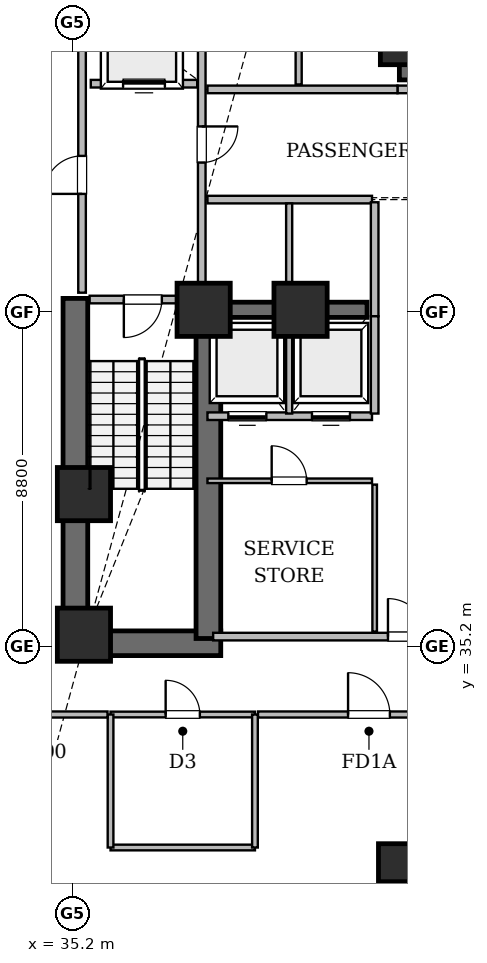
"""IFC4 building model, lengths in metres.
Left out: names, types, materials, properties, quantities, classifications, styles, units other than length and angle.
Written with IfcOpenShell. Run it as: python <this file> out.ifc"""

import sys

from ifc_helpers import new_model, si_unit, direction, frame, frame_2d, origin, origin_2d, place, context, subcontext, project, spatial, rectangle, extrude, element, fill, save


model = new_model("IFC4")
c1 = context("Model", 3, precision=1e-05, world=origin(), true_north=direction((0.0, 1.0)))
c2 = subcontext(c1, "Body", "Model", "MODEL_VIEW")
j1 = project(units=[si_unit("LENGTHUNIT", "METRE"), si_unit("PLANEANGLEUNIT", "RADIAN")], contexts=[c1])
p1 = place(None, origin())
s1 = spatial("IfcSite", under=j1, at=p1, CompositionType="ELEMENT")
p2 = place(p1, origin())
s2 = spatial("IfcBuilding", under=s1, at=p2, CompositionType="ELEMENT")
p3 = place(p2, frame((0.0, 0.0, 14.4)))
s3 = spatial("IfcBuildingStorey", under=s2, at=p3, CompositionType="ELEMENT", Elevation=14.4)
p4 = place(p3, frame((34.95, 35.275, 0.0), z_axis=(0.0, 0.0, 1.0), x_axis=(1.0, 0.0, 0.0)))
e1 = element("IfcWall", 1, at=p4, inside=s3, PredefinedType="SHEAR", context=c2, shape_type="SweptSolid", body=[
    extrude(rectangle(XDim=4.15, YDim=0.65, at=frame_2d((2.075, 0.0))), origin(), (0.0, 0.0, 1.0), 4.5),
])
p5 = place(p3, frame((35.275, 34.95, 0.0), z_axis=(0.0, 0.0, 1.0), x_axis=(0.0, 1.0, 0.0)))
e2 = element("IfcWall", 2, at=p5, inside=s3, PredefinedType="SHEAR", context=c2, shape_type="SweptSolid", body=[
    extrude(rectangle(XDim=9.4, YDim=0.65, at=frame_2d((4.7, 0.0))), origin(), (0.0, 0.0, 1.0), 4.5),
])
p6 = place(p3, frame((38.775, 35.4, 0.0), z_axis=(0.0, 0.0, 1.0), x_axis=(0.0, 1.0, 0.0)))
e3 = element("IfcWall", 3, at=p6, inside=s3, PredefinedType="SHEAR", context=c2, shape_type="SweptSolid", body=[
    extrude(rectangle(XDim=8.95, YDim=0.65, at=frame_2d((4.475, 0.0))), origin(), (0.0, 0.0, 1.0), 4.5),
])
p7 = place(p3, frame((44.0, 50.1, 0.0), z_axis=(0.0, 0.0, 1.0), x_axis=(0.0, 1.0, 0.0)))
e4 = element("IfcWall", 4, at=p7, inside=s3, PredefinedType="SHEAR", context=c2, shape_type="SweptSolid", body=[
    extrude(rectangle(XDim=2.1, YDim=0.4, at=frame_2d((1.05, 0.0))), origin(), (0.0, 0.0, 1.0), 4.5),
])
p8 = place(p3, frame((38.75, 44.05, 0.0), z_axis=(0.0, 0.0, 1.0), x_axis=(1.0, 0.0, 0.0)))
e5 = element("IfcWall", 5, at=p8, inside=s3, PredefinedType="SHEAR", context=c2, shape_type="SweptSolid", body=[
    extrude(rectangle(XDim=4.2, YDim=0.4, at=frame_2d((2.1, 0.0))), origin(), (0.0, 0.0, 1.0), 4.5),
])
for number, where, z_axis, x_axis in (
    (6, (35.5, 35.5, 0.0), (0.0, 0.0, 1.0), (1.0, 0.0, 0.0)),
    (7, (38.65, 44.05, 0.0), (0.0, 0.0, 1.0), (1.0, 0.0, 0.0)),
    (8, (44.0, 51.2, 0.0), (0.0, 0.0, 1.0), (1.0, 0.0, 0.0)),
    (9, (35.5, 39.2, 0.0), (0.0, 0.0, 1.0), (1.0, 0.0, 0.0)),
    (10, (41.2, 44.05, 0.0), (0.0, 0.0, 1.0), (1.0, 0.0, 0.0)),
):
    element("IfcColumn", number, at=place(p3, frame(where, z_axis=z_axis, x_axis=x_axis)), inside=s3, PredefinedType="COLUMN", context=c2, shape_type="SweptSolid", body=[
        extrude(rectangle(XDim=1.4, YDim=1.4, at=origin_2d()), origin(), (0.0, 0.0, 1.0), 4.8),
    ])
p9 = place(p3, frame((44.0, 29.5, 0.0), z_axis=(0.0, 0.0, 1.0), x_axis=(1.0, 0.0, 0.0)))
e11 = element("IfcColumn", 11, at=p9, inside=s3, PredefinedType="COLUMN", context=c2, shape_type="SweptSolid", body=[
    extrude(rectangle(XDim=1.5, YDim=1.0, at=origin_2d()), origin(), (0.0, 0.0, 1.0), 4.8),
])
p10 = place(p3, frame((38.9, 35.45, 0.0), z_axis=(0.0, 0.0, 1.0), x_axis=(1.0, 0.0, 0.0)))
e12 = element("IfcWall", 12, at=p10, inside=s3, PredefinedType="SOLIDWALL", context=c2, shape_type="SweptSolid", body=[
    extrude(rectangle(XDim=10.2, YDim=0.2, at=frame_2d((5.1, 0.0))), origin(), (0.0, 0.0, 1.0), 4.5),
])
p11 = place(p10, frame((4.6, 0.0, 0.0)))
e13 = element("IfcOpeningElement", 13, at=p11, cuts=e12, PredefinedType="OPENING", context=c2, shape_type="SweptSolid", body=[
    extrude(rectangle(XDim=1.0, YDim=2.15, at=frame_2d((0.5, 1.075))), frame((0.0, 0.11, 0.0), z_axis=(0.0, -1.0, 0.0), x_axis=(1.0, 0.0, 0.0)), (0.0, 0.0, 1.0), 0.22),
])
p12 = place(p3, frame((35.45, 44.5, 0.0), z_axis=(0.0, 0.0, 1.0), x_axis=(0.0, 1.0, 0.0)))
e14 = element("IfcWall", 14, at=p12, inside=s3, PredefinedType="SOLIDWALL", context=c2, shape_type="SweptSolid", body=[
    extrude(rectangle(XDim=7.92, YDim=0.2, at=frame_2d((3.96, 0.0))), origin(), (0.0, 0.0, 1.0), 4.5),
])
p13 = place(p12, frame((2.6, 0.0, 0.0)))
e15 = element("IfcOpeningElement", 15, at=p13, cuts=e14, PredefinedType="OPENING", context=c2, shape_type="SweptSolid", body=[
    extrude(rectangle(XDim=1.0, YDim=2.15, at=frame_2d((0.5, 1.075))), frame((0.0, 0.11, 0.0), z_axis=(0.0, -1.0, 0.0), x_axis=(1.0, 0.0, 0.0)), (0.0, 0.0, 1.0), 0.22),
])
p14 = place(p3, frame((38.6, 44.5, 0.0), z_axis=(0.0, 0.0, 1.0), x_axis=(0.0, 1.0, 0.0)))
e16 = element("IfcWall", 16, at=p14, inside=s3, PredefinedType="SOLIDWALL", context=c2, shape_type="SweptSolid", body=[
    extrude(rectangle(XDim=7.92, YDim=0.2, at=frame_2d((3.96, 0.0))), origin(), (0.0, 0.0, 1.0), 4.5),
])
p15 = place(p14, frame((3.425, 0.0, 0.0)))
e17 = element("IfcOpeningElement", 17, at=p15, cuts=e16, PredefinedType="OPENING", context=c2, shape_type="SweptSolid", body=[
    extrude(rectangle(XDim=0.95, YDim=2.15, at=frame_2d((0.475, 1.075))), frame((0.0, 0.11, 0.0), z_axis=(0.0, -1.0, 0.0), x_axis=(1.0, 0.0, 0.0)), (0.0, 0.0, 1.0), 0.22),
])
p16 = place(p3, frame((40.08, 33.4, 0.0), z_axis=(0.0, 0.0, 1.0), x_axis=(1.0, 0.0, 0.0)))
e18 = element("IfcWall", 18, at=p16, inside=s3, PredefinedType="SOLIDWALL", context=c2, shape_type="SweptSolid", body=[
    extrude(rectangle(XDim=5.84, YDim=0.16, at=frame_2d((2.92, 0.0))), origin(), (0.0, 0.0, 1.0), 4.5),
])
p17 = place(p16, frame((2.37, 0.0, 0.0)))
e19 = element("IfcOpeningElement", 19, at=p17, cuts=e18, PredefinedType="OPENING", context=c2, shape_type="SweptSolid", body=[
    extrude(rectangle(XDim=1.1, YDim=2.15, at=frame_2d((0.55, 1.075))), frame((0.0, 0.09, 0.0), z_axis=(0.0, -1.0, 0.0), x_axis=(1.0, 0.0, 0.0)), (0.0, 0.0, 1.0), 0.18),
])
p18 = place(p3, frame((43.75, 49.85, 0.0), z_axis=(0.0, 0.0, 1.0), x_axis=(1.0, 0.0, 0.0)))
e20 = element("IfcWall", 20, at=p18, inside=s3, PredefinedType="SOLIDWALL", context=c2, shape_type="SweptSolid", body=[
    extrude(rectangle(XDim=5.5, YDim=0.2, at=frame_2d((2.75, 0.0))), origin(), (0.0, 0.0, 1.0), 3.588),
])
p19 = place(p18, frame((3.5, 0.0, 0.0)))
e21 = element("IfcOpeningElement", 21, at=p19, cuts=e20, PredefinedType="OPENING", context=c2, shape_type="SweptSolid", body=[
    extrude(rectangle(XDim=1.1, YDim=2.15, at=frame_2d((0.55, 1.075))), frame((0.0, 0.11, 0.0), z_axis=(0.0, -1.0, 0.0), x_axis=(1.0, 0.0, 0.0)), (0.0, 0.0, 1.0), 0.22),
])
p20 = place(p3, frame((38.75, 41.25, 0.0), z_axis=(0.0, 0.0, 1.0), x_axis=(1.0, 0.0, 0.0)))
e22 = element("IfcWall", 22, at=p20, inside=s3, PredefinedType="SOLIDWALL", context=c2, shape_type="SweptSolid", body=[
    extrude(rectangle(XDim=4.33, YDim=0.2, at=frame_2d((2.165, 0.0))), origin(), (0.0, 0.0, 1.0), 4.5),
])
p21 = place(p20, frame((0.55, 0.0, 0.0)))
e23 = element("IfcOpeningElement", 23, at=p21, cuts=e22, PredefinedType="OPENING", context=c2, shape_type="SweptSolid", body=[
    extrude(rectangle(XDim=1.0, YDim=2.15, at=frame_2d((0.5, 1.075))), frame((0.0, 0.11, 0.0), z_axis=(0.0, -1.0, 0.0), x_axis=(1.0, 0.0, 0.0)), (0.0, 0.0, 1.0), 0.22),
])
p22 = place(p20, frame((2.75, 0.0, 0.0)))
e24 = element("IfcOpeningElement", 24, at=p22, cuts=e22, PredefinedType="OPENING", context=c2, shape_type="SweptSolid", body=[
    extrude(rectangle(XDim=1.0, YDim=2.15, at=frame_2d((0.5, 1.075))), frame((0.0, 0.11, 0.0), z_axis=(0.0, -1.0, 0.0), x_axis=(1.0, 0.0, 0.0)), (0.0, 0.0, 1.0), 0.22),
])
p23 = place(p3, frame((38.75, 39.55, 0.0), z_axis=(0.0, 0.0, 1.0), x_axis=(1.0, 0.0, 0.0)))
e25 = element("IfcWall", 25, at=p23, inside=s3, PredefinedType="PARTITIONING", context=c2, shape_type="SweptSolid", body=[
    extrude(rectangle(XDim=4.33, YDim=0.12, at=frame_2d((2.165, 0.0))), origin(), (0.0, 0.0, 1.0), 4.5),
])
p24 = place(p23, frame((1.69, 0.0, 0.0)))
e26 = element("IfcOpeningElement", 26, at=p24, cuts=e25, PredefinedType="OPENING", context=c2, shape_type="SweptSolid", body=[
    extrude(rectangle(XDim=0.92, YDim=2.1, at=frame_2d((0.46, 1.05))), frame((0.0, 0.07, 0.0), z_axis=(0.0, -1.0, 0.0), x_axis=(1.0, 0.0, 0.0)), (0.0, 0.0, 1.0), 0.14),
])
p25 = place(p3, frame((36.2, 33.4, 0.0), z_axis=(0.0, 0.0, 1.0), x_axis=(1.0, 0.0, 0.0)))
e27 = element("IfcWall", 27, at=p25, inside=s3, PredefinedType="PLUMBINGWALL", context=c2, shape_type="SweptSolid", body=[
    extrude(rectangle(XDim=3.8, YDim=0.15, at=frame_2d((1.9, 0.0))), origin(), (0.0, 0.0, 1.0), 3.688),
])
p26 = place(p25, frame((1.45, 0.0, 0.0)))
e28 = element("IfcOpeningElement", 28, at=p26, cuts=e27, PredefinedType="OPENING", context=c2, shape_type="SweptSolid", body=[
    extrude(rectangle(XDim=0.9, YDim=2.1, at=frame_2d((0.45, 1.05))), frame((0.0, 0.085, 0.0), z_axis=(0.0, -1.0, 0.0), x_axis=(1.0, 0.0, 0.0)), (0.0, 0.0, 1.0), 0.17),
])
p27 = place(p3, frame((35.65, 44.32, 0.0), z_axis=(0.0, 0.0, 1.0), x_axis=(1.0, 0.0, 0.0)))
e29 = element("IfcWall", 29, at=p27, inside=s3, PredefinedType="SOLIDWALL", context=c2, shape_type="SweptSolid", body=[
    extrude(rectangle(XDim=2.8, YDim=0.2, at=frame_2d((1.4, 0.0))), origin(), (0.0, 0.0, 1.0), 4.5),
])
p28 = place(p27, frame((0.9, 0.0, 0.0)))
e30 = element("IfcOpeningElement", 30, at=p28, cuts=e29, PredefinedType="OPENING", context=c2, shape_type="SweptSolid", body=[
    extrude(rectangle(XDim=1.0, YDim=2.15, at=frame_2d((0.5, 1.075))), frame((0.0, 0.11, 0.0), z_axis=(0.0, -1.0, 0.0), x_axis=(1.0, 0.0, 0.0)), (0.0, 0.0, 1.0), 0.22),
])
p29 = place(p3, frame((35.68, 50.0, 0.0), z_axis=(0.0, 0.0, 1.0), x_axis=(1.0, 0.0, 0.0)))
e31 = element("IfcWall", 31, at=p29, inside=s3, PredefinedType="SOLIDWALL", context=c2, shape_type="SweptSolid", body=[
    extrude(rectangle(XDim=2.8, YDim=0.2, at=frame_2d((1.4, 0.0))), origin(), (0.0, 0.0, 1.0), 4.5),
])
p30 = place(p29, frame((0.85, 0.0, 0.0)))
e32 = element("IfcOpeningElement", 32, at=p30, cuts=e31, PredefinedType="OPENING", context=c2, shape_type="SweptSolid", body=[
    extrude(rectangle(XDim=1.1, YDim=2.15, at=frame_2d((0.55, 1.075))), frame((0.0, 0.11, 0.0), z_axis=(0.0, -1.0, 0.0), x_axis=(1.0, 0.0, 0.0)), (0.0, 0.0, 1.0), 0.22),
])
p31 = place(p3, frame((38.75, 49.85, 0.0), z_axis=(0.0, 0.0, 1.0), x_axis=(1.0, 0.0, 0.0)))
e33 = element("IfcWall", 33, at=p31, inside=s3, PredefinedType="SOLIDWALL", context=c2, shape_type="SweptSolid", body=[
    extrude(rectangle(XDim=5.0, YDim=0.2, at=frame_2d((2.5, 0.0))), origin(), (0.0, 0.0, 1.0), 4.5),
])
p32 = place(p3, frame((38.75, 46.95, 0.0), z_axis=(0.0, 0.0, 1.0), x_axis=(1.0, 0.0, 0.0)))
e34 = element("IfcWall", 34, at=p32, inside=s3, PredefinedType="SOLIDWALL", context=c2, shape_type="SweptSolid", body=[
    extrude(rectangle(XDim=4.33, YDim=0.2, at=frame_2d((2.165, 0.0))), origin(), (0.0, 0.0, 1.0), 4.5),
])
p33 = place(p3, frame((43.15, 35.58, 0.0), z_axis=(0.0, 0.0, 1.0), x_axis=(0.0, 1.0, 0.0)))
e35 = element("IfcWall", 35, at=p33, inside=s3, PredefinedType="PARTITIONING", context=c2, shape_type="SweptSolid", body=[
    extrude(rectangle(XDim=3.87, YDim=0.12, at=frame_2d((1.935, 0.0))), origin(), (0.0, 0.0, 1.0), 4.5),
])
p34 = place(p3, frame((36.2, 29.9, 0.0), z_axis=(0.0, 0.0, 1.0), x_axis=(1.0, 0.0, 0.0)))
e36 = element("IfcWall", 36, at=p34, inside=s3, PredefinedType="PLUMBINGWALL", context=c2, shape_type="SweptSolid", body=[
    extrude(rectangle(XDim=3.8, YDim=0.15, at=frame_2d((1.9, 0.0))), origin(), (0.0, 0.0, 1.0), 4.5),
])
for number, where, z_axis, x_axis in (
    (37, (36.2, 33.4, 0.0), (0.0, 0.0, 1.0), (0.0, -1.0, 0.0)),
    (38, (40.0, 29.9, 0.0), (0.0, 0.0, 1.0), (0.0, 1.0, 0.0)),
):
    element("IfcWall", number, at=place(p3, frame(where, z_axis=z_axis, x_axis=x_axis)), inside=s3, PredefinedType="PLUMBINGWALL", context=c2, shape_type="SweptSolid", body=[
        extrude(rectangle(XDim=3.5, YDim=0.15, at=frame_2d((1.75, 0.0))), origin(), (0.0, 0.0, 1.0), 3.688),
    ])
p35 = place(p3, frame((43.15, 43.88, 0.0), z_axis=(0.0, 0.0, 1.0), x_axis=(0.0, 1.0, 0.0)))
e39 = element("IfcWall", 39, at=p35, inside=s3, PredefinedType="SOLIDWALL", context=c2, shape_type="SweptSolid", body=[
    extrude(rectangle(XDim=3.0, YDim=0.2, at=frame_2d((1.5, 0.0))), origin(), (0.0, 0.0, 1.0), 4.5),
])
p36 = place(p3, frame((33.48, 33.4, 0.0), z_axis=(0.0, 0.0, 1.0), x_axis=(1.0, 0.0, 0.0)))
e40 = element("IfcWall", 40, at=p36, inside=s3, PredefinedType="SOLIDWALL", context=c2, shape_type="SweptSolid", body=[
    extrude(rectangle(XDim=2.64, YDim=0.16, at=frame_2d((1.32, 0.0))), origin(), (0.0, 0.0, 1.0), 3.688),
])
p37 = place(p3, frame((43.15, 41.32, 0.0), z_axis=(0.0, 0.0, 1.0), x_axis=(0.0, 1.0, 0.0)))
e41 = element("IfcWall", 41, at=p37, inside=s3, PredefinedType="SOLIDWALL", context=c2, shape_type="SweptSolid", body=[
    extrude(rectangle(XDim=2.56, YDim=0.2, at=frame_2d((1.28, 0.0))), origin(), (0.0, 0.0, 1.0), 4.5),
])
p38 = place(p3, frame((40.9, 44.3, 0.0), z_axis=(0.0, 0.0, 1.0), x_axis=(0.0, 1.0, 0.0)))
e42 = element("IfcWall", 42, at=p38, inside=s3, PredefinedType="SOLIDWALL", context=c2, shape_type="SweptSolid", body=[
    extrude(rectangle(XDim=2.55, YDim=0.16, at=frame_2d((1.275, 0.0))), origin(), (0.0, 0.0, 1.0), 4.5),
])
p39 = place(p3, frame((40.9, 41.32, 0.0), z_axis=(0.0, 0.0, 1.0), x_axis=(0.0, 1.0, 0.0)))
e43 = element("IfcWall", 43, at=p39, inside=s3, PredefinedType="SOLIDWALL", context=c2, shape_type="SweptSolid", body=[
    extrude(rectangle(XDim=2.53, YDim=0.16, at=frame_2d((1.265, 0.0))), origin(), (0.0, 0.0, 1.0), 4.5),
])
p40 = place(p3, frame((41.15, 49.98, 0.0), z_axis=(0.0, 0.0, 1.0), x_axis=(0.0, 1.0, 0.0)))
e44 = element("IfcWall", 44, at=p40, inside=s3, PredefinedType="SOLIDWALL", context=c2, shape_type="SweptSolid", body=[
    extrude(rectangle(XDim=2.37, YDim=0.16, at=frame_2d((1.185, 0.0))), origin(), (0.0, 0.0, 1.0), 4.5),
])
p41 = place(p28, frame((1.0, 0.0, 0.0), z_axis=(0.0, 0.0, 1.0), x_axis=(-1.0, 0.0, 0.0)))
e45 = element("IfcDoor", 45, at=p41, inside=s3, OperationType="SINGLE_SWING_LEFT", PredefinedType="DOOR", context=c2, shape_type="SweptSolid", body=[
    extrude(rectangle(XDim=1.0, YDim=2.15, at=frame_2d((0.5, 1.075))), frame((0.0, 0.025, 0.0), z_axis=(0.0, -1.0, 0.0), x_axis=(1.0, 0.0, 0.0)), (0.0, 0.0, 1.0), 0.05),
])
fill(e30, e45)
p42 = place(p13, origin())
e46 = element("IfcDoor", 46, at=p42, inside=s3, OperationType="SINGLE_SWING_LEFT", PredefinedType="DOOR", context=c2, shape_type="SweptSolid", body=[
    extrude(rectangle(XDim=1.0, YDim=2.15, at=frame_2d((0.5, 1.075))), frame((0.0, 0.025, 0.0), z_axis=(0.0, -1.0, 0.0), x_axis=(1.0, 0.0, 0.0)), (0.0, 0.0, 1.0), 0.05),
])
fill(e15, e46)
p43 = place(p15, frame((0.95, 0.0, 0.0), z_axis=(0.0, 0.0, 1.0), x_axis=(-1.0, 0.0, 0.0)))
e47 = element("IfcDoor", 47, at=p43, inside=s3, OperationType="SINGLE_SWING_RIGHT", PredefinedType="DOOR", context=c2, shape_type="SweptSolid", body=[
    extrude(rectangle(XDim=0.95, YDim=2.15, at=frame_2d((0.475, 1.075))), frame((0.0, 0.025, 0.0), z_axis=(0.0, -1.0, 0.0), x_axis=(1.0, 0.0, 0.0)), (0.0, 0.0, 1.0), 0.05),
])
fill(e17, e47)
p44 = place(p30, origin())
e48 = element("IfcDoor", 48, at=p44, inside=s3, OperationType="SLIDING_TO_LEFT", PredefinedType="DOOR", context=c2, shape_type="SweptSolid", body=[
    extrude(rectangle(XDim=1.1, YDim=2.15, at=frame_2d((0.55, 1.075))), frame((0.0, 0.025, 0.0), z_axis=(0.0, -1.0, 0.0), x_axis=(1.0, 0.0, 0.0)), (0.0, 0.0, 1.0), 0.05),
])
fill(e32, e48)
p45 = place(p11, origin())
e49 = element("IfcDoor", 49, at=p45, inside=s3, OperationType="SINGLE_SWING_LEFT", PredefinedType="DOOR", context=c2, shape_type="SweptSolid", body=[
    extrude(rectangle(XDim=1.0, YDim=2.15, at=frame_2d((0.5, 1.075))), frame((0.0, 0.025, 0.0), z_axis=(0.0, -1.0, 0.0), x_axis=(1.0, 0.0, 0.0)), (0.0, 0.0, 1.0), 0.05),
])
fill(e13, e49)
p46 = place(p21, frame((1.0, 0.0, 0.0), z_axis=(0.0, 0.0, 1.0), x_axis=(-1.0, 0.0, 0.0)))
e50 = element("IfcDoor", 50, at=p46, inside=s3, OperationType="SLIDING_TO_LEFT", PredefinedType="DOOR", context=c2, shape_type="SweptSolid", body=[
    extrude(rectangle(XDim=1.0, YDim=2.15, at=frame_2d((0.5, 1.075))), frame((0.0, 0.025, 0.0), z_axis=(0.0, -1.0, 0.0), x_axis=(1.0, 0.0, 0.0)), (0.0, 0.0, 1.0), 0.05),
])
fill(e23, e50)
p47 = place(p22, frame((1.0, 0.0, 0.0), z_axis=(0.0, 0.0, 1.0), x_axis=(-1.0, 0.0, 0.0)))
e51 = element("IfcDoor", 51, at=p47, inside=s3, OperationType="SLIDING_TO_LEFT", PredefinedType="DOOR", context=c2, shape_type="SweptSolid", body=[
    extrude(rectangle(XDim=1.0, YDim=2.15, at=frame_2d((0.5, 1.075))), frame((0.0, 0.025, 0.0), z_axis=(0.0, -1.0, 0.0), x_axis=(1.0, 0.0, 0.0)), (0.0, 0.0, 1.0), 0.05),
])
fill(e24, e51)
p48 = place(p24, origin())
e52 = element("IfcDoor", 52, at=p48, inside=s3, OperationType="SINGLE_SWING_LEFT", PredefinedType="DOOR", context=c2, shape_type="SweptSolid", body=[
    extrude(rectangle(XDim=0.92, YDim=2.1, at=frame_2d((0.46, 1.05))), frame((0.0, 0.025, 0.0), z_axis=(0.0, -1.0, 0.0), x_axis=(1.0, 0.0, 0.0)), (0.0, 0.0, 1.0), 0.05),
])
fill(e26, e52)
p49 = place(p26, origin())
e53 = element("IfcDoor", 53, at=p49, inside=s3, OperationType="SINGLE_SWING_LEFT", PredefinedType="DOOR", context=c2, shape_type="SweptSolid", body=[
    extrude(rectangle(XDim=0.9, YDim=2.1, at=frame_2d((0.45, 1.05))), frame((0.0, 0.025, 0.0), z_axis=(0.0, -1.0, 0.0), x_axis=(1.0, 0.0, 0.0)), (0.0, 0.0, 1.0), 0.05),
])
fill(e28, e53)
p50 = place(p17, origin())
e54 = element("IfcDoor", 54, at=p50, inside=s3, OperationType="SINGLE_SWING_LEFT", PredefinedType="DOOR", context=c2, shape_type="SweptSolid", body=[
    extrude(rectangle(XDim=1.1, YDim=2.15, at=frame_2d((0.55, 1.075))), frame((0.0, 0.025, 0.0), z_axis=(0.0, -1.0, 0.0), x_axis=(1.0, 0.0, 0.0)), (0.0, 0.0, 1.0), 0.05),
])
fill(e19, e54)
save(model, sys.argv[1])
